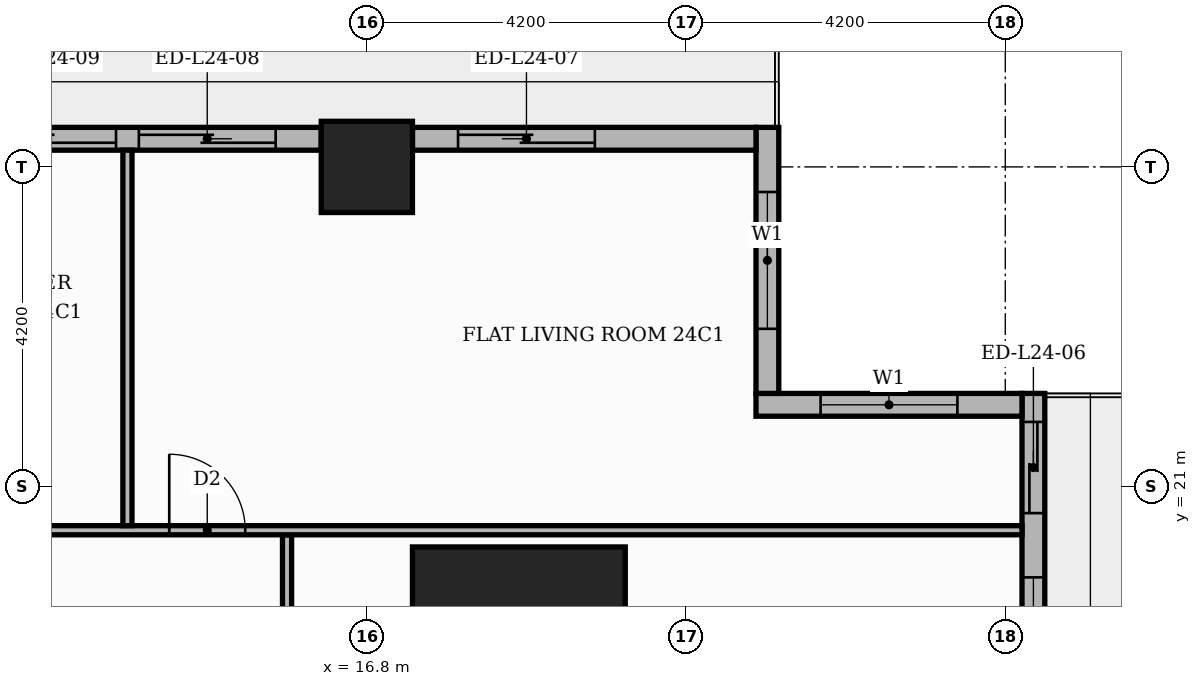
"""IFC4 building model, lengths in metres.
Left out: names, types, materials, properties, quantities, classifications, styles, units other than length and angle.
Written with IfcOpenShell. Run it as: python <this file> out.ifc"""

import sys

from ifc_helpers import new_model, si_unit, direction, frame, frame_2d, origin, origin_2d, place, context, subcontext, project, spatial, rectangle, extrude, element, fill, save


model = new_model("IFC4")
c1 = context("Model", 3, precision=1e-05, world=origin(), true_north=direction((0.0, 1.0)))
c2 = subcontext(c1, "Body", "Model", "MODEL_VIEW")
j1 = project(units=[si_unit("LENGTHUNIT", "METRE"), si_unit("PLANEANGLEUNIT", "RADIAN")], contexts=[c1])
p1 = place(None, origin())
s1 = spatial("IfcSite", under=j1, at=p1, CompositionType="ELEMENT")
p2 = place(p1, origin())
s2 = spatial("IfcBuilding", under=s1, at=p2, CompositionType="ELEMENT")
p3 = place(p2, frame((0.0, 0.0, 102.6)))
s3 = spatial("IfcBuildingStorey", under=s2, at=p3, CompositionType="ELEMENT", Elevation=102.6)
p4 = place(p3, frame((18.8, 18.8, 0.0), z_axis=(0.0, 0.0, 1.0), x_axis=(1.0, 0.0, 0.0)))
e1 = element("IfcColumn", 1, at=p4, inside=s3, PredefinedType="COLUMN", context=c2, shape_type="SweptSolid", body=[
    extrude(rectangle(XDim=2.8, YDim=2.8, at=origin_2d()), origin(), (0.0, 0.0, 1.0), 3.9),
])
p5 = place(p3, frame((16.8, 25.2, 0.0), z_axis=(0.0, 0.0, 1.0), x_axis=(1.0, 0.0, 0.0)))
e2 = element("IfcColumn", 2, at=p5, inside=s3, PredefinedType="COLUMN", context=c2, shape_type="SweptSolid", body=[
    extrude(rectangle(XDim=1.2, YDim=1.2, at=origin_2d()), origin(), (0.0, 0.0, 1.0), 3.9),
])
p6 = place(p3, frame((25.57, 17.4, 0.0), z_axis=(0.0, 0.0, 1.0), x_axis=(0.0, 1.0, 0.0)))
e3 = element("IfcWall", 3, at=p6, inside=s3, PredefinedType="STANDARD", context=c2, shape_type="SweptSolid", body=[
    extrude(rectangle(XDim=4.82, YDim=0.3, at=frame_2d((2.41, 0.0))), origin(), (0.0, 0.0, 1.0), 3.48),
])
p7 = place(p6, frame((0.6, 0.0, 0.9)))
e4 = element("IfcOpeningElement", 4, at=p7, cuts=e3, PredefinedType="OPENING", context=c2, shape_type="SweptSolid", body=[
    extrude(rectangle(XDim=1.8, YDim=2.1, at=frame_2d((0.9, 1.05))), frame((0.0, 0.16, 0.0), z_axis=(0.0, -1.0, 0.0), x_axis=(1.0, 0.0, 0.0)), (0.0, 0.0, 1.0), 0.32),
])
p8 = place(p6, frame((3.245, 0.0, 0.0)))
e5 = element("IfcOpeningElement", 5, at=p8, cuts=e3, PredefinedType="OPENING", context=c2, shape_type="SweptSolid", body=[
    extrude(rectangle(XDim=1.2, YDim=2.4, at=frame_2d((0.6, 1.2))), frame((0.0, 0.16, 0.0), z_axis=(0.0, -1.0, 0.0), x_axis=(1.0, 0.0, 0.0)), (0.0, 0.0, 1.0), 0.32),
])
p9 = place(p3, frame((25.42, 22.07, 0.0), z_axis=(0.0, 0.0, 1.0), x_axis=(-1.0, 0.0, 0.0)))
e6 = element("IfcWall", 6, at=p9, inside=s3, PredefinedType="STANDARD", context=c2, shape_type="SweptSolid", body=[
    extrude(rectangle(XDim=3.5, YDim=0.3, at=frame_2d((1.75, 0.0))), origin(), (0.0, 0.0, 1.0), 3.48),
])
p10 = place(p9, frame((0.85, 0.0, 0.9)))
e7 = element("IfcOpeningElement", 7, at=p10, cuts=e6, PredefinedType="OPENING", context=c2, shape_type="SweptSolid", body=[
    extrude(rectangle(XDim=1.8, YDim=2.1, at=frame_2d((0.9, 1.05))), frame((0.0, 0.16, 0.0), z_axis=(0.0, -1.0, 0.0), x_axis=(1.0, 0.0, 0.0)), (0.0, 0.0, 1.0), 0.32),
])
p11 = place(p3, frame((22.07, 22.22, 0.0), z_axis=(0.0, 0.0, 1.0), x_axis=(0.0, 1.0, 0.0)))
e8 = element("IfcWall", 8, at=p11, inside=s3, PredefinedType="STANDARD", context=c2, shape_type="SweptSolid", body=[
    extrude(rectangle(XDim=3.5, YDim=0.3, at=frame_2d((1.75, 0.0))), origin(), (0.0, 0.0, 1.0), 3.48),
])
p12 = place(p11, frame((0.85, 0.0, 0.9)))
e9 = element("IfcOpeningElement", 9, at=p12, cuts=e8, PredefinedType="OPENING", context=c2, shape_type="SweptSolid", body=[
    extrude(rectangle(XDim=1.8, YDim=2.1, at=frame_2d((0.9, 1.05))), frame((0.0, 0.16, 0.0), z_axis=(0.0, -1.0, 0.0), x_axis=(1.0, 0.0, 0.0)), (0.0, 0.0, 1.0), 0.32),
])
p13 = place(p3, frame((21.92, 25.57, 0.0), z_axis=(0.0, 0.0, 1.0), x_axis=(-1.0, 0.0, 0.0)))
e10 = element("IfcWall", 10, at=p13, inside=s3, PredefinedType="STANDARD", context=c2, shape_type="SweptSolid", body=[
    extrude(rectangle(XDim=4.52, YDim=0.3, at=frame_2d((2.26, 0.0))), origin(), (0.0, 0.0, 1.0), 3.48),
])
p14 = place(p13, frame((2.12, 0.0, 0.0)))
e11 = element("IfcOpeningElement", 11, at=p14, cuts=e10, PredefinedType="OPENING", context=c2, shape_type="SweptSolid", body=[
    extrude(rectangle(XDim=1.8, YDim=2.4, at=frame_2d((0.9, 1.2))), frame((0.0, 0.16, 0.0), z_axis=(0.0, -1.0, 0.0), x_axis=(1.0, 0.0, 0.0)), (0.0, 0.0, 1.0), 0.32),
])
p15 = place(p3, frame((16.2, 25.57, 0.0), z_axis=(0.0, 0.0, 1.0), x_axis=(-1.0, 0.0, 0.0)))
e12 = element("IfcWall", 12, at=p15, inside=s3, PredefinedType="STANDARD", context=c2, shape_type="SweptSolid", body=[
    extrude(rectangle(XDim=7.2, YDim=0.3, at=frame_2d((3.6, 0.0))), origin(), (0.0, 0.0, 1.0), 3.48),
])
p16 = place(p15, frame((0.6, 0.0, 0.0)))
e13 = element("IfcOpeningElement", 13, at=p16, cuts=e12, PredefinedType="OPENING", context=c2, shape_type="SweptSolid", body=[
    extrude(rectangle(XDim=1.8, YDim=2.4, at=frame_2d((0.9, 1.2))), frame((0.0, 0.16, 0.0), z_axis=(0.0, -1.0, 0.0), x_axis=(1.0, 0.0, 0.0)), (0.0, 0.0, 1.0), 0.32),
])
p17 = place(p15, frame((2.7, 0.0, 0.0)))
e14 = element("IfcOpeningElement", 14, at=p17, cuts=e12, PredefinedType="OPENING", context=c2, shape_type="SweptSolid", body=[
    extrude(rectangle(XDim=1.8, YDim=2.4, at=frame_2d((0.9, 1.2))), frame((0.0, 0.16, 0.0), z_axis=(0.0, -1.0, 0.0), x_axis=(1.0, 0.0, 0.0)), (0.0, 0.0, 1.0), 0.32),
])
p18 = place(p15, frame((4.8, 0.0, 0.9)))
e15 = element("IfcOpeningElement", 15, at=p18, cuts=e12, PredefinedType="OPENING", context=c2, shape_type="SweptSolid", body=[
    extrude(rectangle(XDim=1.8, YDim=2.1, at=frame_2d((0.9, 1.05))), frame((0.0, 0.16, 0.0), z_axis=(0.0, -1.0, 0.0), x_axis=(1.0, 0.0, 0.0)), (0.0, 0.0, 1.0), 0.32),
])
p19 = place(p3, frame((15.75, 13.75, 0.0), z_axis=(0.0, 0.0, 1.0), x_axis=(0.0, 1.0, 0.0)))
e16 = element("IfcWall", 16, at=p19, inside=s3, PredefinedType="PARTITIONING", context=c2, shape_type="SweptSolid", body=[
    extrude(rectangle(XDim=6.61, YDim=0.12, at=frame_2d((3.305, 0.0))), origin(), (0.0, 0.0, 1.0), 3.48),
])
p20 = place(p19, frame((2.785, 0.0, 0.0)))
e17 = element("IfcOpeningElement", 17, at=p20, cuts=e16, PredefinedType="OPENING", context=c2, shape_type="SweptSolid", body=[
    extrude(rectangle(XDim=1.0, YDim=2.1, at=frame_2d((0.5, 1.05))), frame((0.0, 0.07, 0.0), z_axis=(0.0, -1.0, 0.0), x_axis=(1.0, 0.0, 0.0)), (0.0, 0.0, 1.0), 0.14),
])
p21 = place(p3, frame((5.35, 20.42, 0.0), z_axis=(0.0, 0.0, 1.0), x_axis=(1.0, 0.0, 0.0)))
e18 = element("IfcWall", 18, at=p21, inside=s3, PredefinedType="PARTITIONING", context=c2, shape_type="SweptSolid", body=[
    extrude(rectangle(XDim=20.07, YDim=0.12, at=frame_2d((10.035, 0.0))), origin(), (0.0, 0.0, 1.0), 3.48),
])
p22 = place(p21, frame((8.85, 0.0, 0.0)))
e19 = element("IfcOpeningElement", 19, at=p22, cuts=e18, PredefinedType="OPENING", context=c2, shape_type="SweptSolid", body=[
    extrude(rectangle(XDim=1.0, YDim=2.1, at=frame_2d((0.5, 1.05))), frame((0.0, 0.07, 0.0), z_axis=(0.0, -1.0, 0.0), x_axis=(1.0, 0.0, 0.0)), (0.0, 0.0, 1.0), 0.14),
])
p23 = place(p21, frame((5.75, 0.0, 0.0)))
e20 = element("IfcOpeningElement", 20, at=p23, cuts=e18, PredefinedType="OPENING", context=c2, shape_type="SweptSolid", body=[
    extrude(rectangle(XDim=0.9, YDim=2.1, at=frame_2d((0.45, 1.05))), frame((0.0, 0.07, 0.0), z_axis=(0.0, -1.0, 0.0), x_axis=(1.0, 0.0, 0.0)), (0.0, 0.0, 1.0), 0.14),
])
p24 = place(p3, frame((13.65, 20.48, 0.0), z_axis=(0.0, 0.0, 1.0), x_axis=(0.0, 1.0, 0.0)))
e21 = element("IfcWall", 21, at=p24, inside=s3, PredefinedType="PARTITIONING", context=c2, shape_type="SweptSolid", body=[
    extrude(rectangle(XDim=4.94, YDim=0.12, at=frame_2d((2.47, 0.0))), origin(), (0.0, 0.0, 1.0), 3.48),
])
p25 = place(p7, origin())
e22 = element("IfcWindow", 22, at=p25, inside=s3, PartitioningType="SINGLE_PANEL", PredefinedType="WINDOW", context=c2, shape_type="SweptSolid", body=[
    extrude(rectangle(XDim=1.8, YDim=2.1, at=frame_2d((0.9, 1.05))), frame((0.0, 0.03, 0.0), z_axis=(0.0, -1.0, 0.0), x_axis=(1.0, 0.0, 0.0)), (0.0, 0.0, 1.0), 0.06),
])
fill(e4, e22)
p26 = place(p8, origin())
e23 = element("IfcDoor", 23, at=p26, inside=s3, OperationType="SLIDING_TO_RIGHT", PredefinedType="DOOR", context=c2, shape_type="SweptSolid", body=[
    extrude(rectangle(XDim=1.2, YDim=2.4, at=frame_2d((0.6, 1.2))), frame((0.0, 0.025, 0.0), z_axis=(0.0, -1.0, 0.0), x_axis=(1.0, 0.0, 0.0)), (0.0, 0.0, 1.0), 0.05),
])
fill(e5, e23)
p27 = place(p10, origin())
e24 = element("IfcWindow", 24, at=p27, inside=s3, PartitioningType="SINGLE_PANEL", PredefinedType="WINDOW", context=c2, shape_type="SweptSolid", body=[
    extrude(rectangle(XDim=1.8, YDim=2.1, at=frame_2d((0.9, 1.05))), frame((0.0, 0.03, 0.0), z_axis=(0.0, -1.0, 0.0), x_axis=(1.0, 0.0, 0.0)), (0.0, 0.0, 1.0), 0.06),
])
fill(e7, e24)
p28 = place(p12, origin())
e25 = element("IfcWindow", 25, at=p28, inside=s3, PartitioningType="SINGLE_PANEL", PredefinedType="WINDOW", context=c2, shape_type="SweptSolid", body=[
    extrude(rectangle(XDim=1.8, YDim=2.1, at=frame_2d((0.9, 1.05))), frame((0.0, 0.03, 0.0), z_axis=(0.0, -1.0, 0.0), x_axis=(1.0, 0.0, 0.0)), (0.0, 0.0, 1.0), 0.06),
])
fill(e9, e25)
p29 = place(p14, origin())
e26 = element("IfcDoor", 26, at=p29, inside=s3, OperationType="SLIDING_TO_RIGHT", PredefinedType="DOOR", context=c2, shape_type="SweptSolid", body=[
    extrude(rectangle(XDim=1.8, YDim=2.4, at=frame_2d((0.9, 1.2))), frame((0.0, 0.025, 0.0), z_axis=(0.0, -1.0, 0.0), x_axis=(1.0, 0.0, 0.0)), (0.0, 0.0, 1.0), 0.05),
])
fill(e11, e26)
p30 = place(p16, origin())
e27 = element("IfcDoor", 27, at=p30, inside=s3, OperationType="SLIDING_TO_LEFT", PredefinedType="DOOR", context=c2, shape_type="SweptSolid", body=[
    extrude(rectangle(XDim=1.8, YDim=2.4, at=frame_2d((0.9, 1.2))), frame((0.0, 0.025, 0.0), z_axis=(0.0, -1.0, 0.0), x_axis=(1.0, 0.0, 0.0)), (0.0, 0.0, 1.0), 0.05),
])
fill(e13, e27)
p31 = place(p17, origin())
e28 = element("IfcDoor", 28, at=p31, inside=s3, OperationType="SLIDING_TO_RIGHT", PredefinedType="DOOR", context=c2, shape_type="SweptSolid", body=[
    extrude(rectangle(XDim=1.8, YDim=2.4, at=frame_2d((0.9, 1.2))), frame((0.0, 0.025, 0.0), z_axis=(0.0, -1.0, 0.0), x_axis=(1.0, 0.0, 0.0)), (0.0, 0.0, 1.0), 0.05),
])
fill(e14, e28)
p32 = place(p22, origin())
e29 = element("IfcDoor", 29, at=p32, inside=s3, OperationType="SINGLE_SWING_LEFT", PredefinedType="DOOR", context=c2, shape_type="SweptSolid", body=[
    extrude(rectangle(XDim=1.0, YDim=2.1, at=frame_2d((0.5, 1.05))), frame((0.0, 0.025, 0.0), z_axis=(0.0, -1.0, 0.0), x_axis=(1.0, 0.0, 0.0)), (0.0, 0.0, 1.0), 0.05),
])
fill(e19, e29)
save(model, sys.argv[1])
